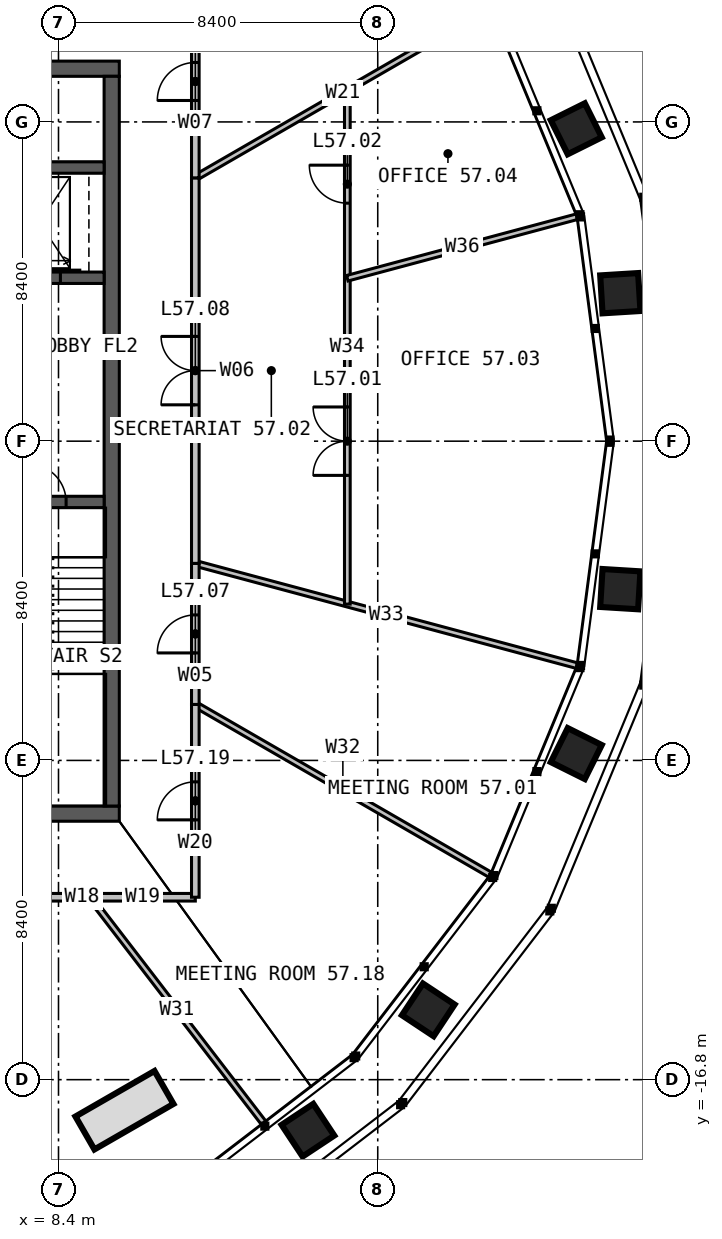
"""IFC4 building model, lengths in metres.
Left out: names, types, materials, properties, quantities, classifications, styles, units other than length and angle.
Written with IfcOpenShell. Run it as: python <this file> out.ifc"""

import sys

from ifc_helpers import new_model, si_unit, direction, frame, frame_2d, origin, place, context, subcontext, project, spatial, rectangle, extrude, element, fill, save


model = new_model("IFC4")
c1 = context("Model", 3, precision=1e-05, world=origin(), true_north=direction((0.0, 1.0)))
c2 = subcontext(c1, "Body", "Model", "MODEL_VIEW")
j1 = project(units=[si_unit("LENGTHUNIT", "METRE"), si_unit("PLANEANGLEUNIT", "RADIAN")], contexts=[c1])
p1 = place(None, origin())
s1 = spatial("IfcSite", under=j1, at=p1, CompositionType="ELEMENT")
p2 = place(p1, origin())
s2 = spatial("IfcBuilding", under=s1, at=p2, CompositionType="ELEMENT")
p3 = place(p2, frame((0.0, 0.0, 236.0)))
s3 = spatial("IfcBuildingStorey", under=s2, at=p3, CompositionType="ELEMENT", Elevation=236.0)
p4 = place(p3, frame((-10.0, 9.8, 0.0), z_axis=(0.0, 0.0, 1.0), x_axis=(1.0, 0.0, 0.0)))
e1 = element("IfcWall", 1, at=p4, inside=s3, PredefinedType="SOLIDWALL", context=c2, shape_type="SweptSolid", body=[
    extrude(rectangle(XDim=20.0, YDim=0.4, at=frame_2d((10.0, 0.0))), origin(), (0.0, 0.0, 1.0), 4.0),
])
p5 = place(p4, frame((9.4, 0.0, 0.0)))
e2 = element("IfcOpeningElement", 2, at=p5, cuts=e1, PredefinedType="OPENING", context=c2, shape_type="SweptSolid", body=[
    extrude(rectangle(XDim=1.2, YDim=2.2, at=frame_2d((0.6, 1.1))), frame((0.0, 0.21, 0.0), z_axis=(0.0, -1.0, 0.0), x_axis=(1.0, 0.0, 0.0)), (0.0, 0.0, 1.0), 0.42),
])
p6 = place(p3, frame((10.0, -9.8, 0.0), z_axis=(0.0, 0.0, 1.0), x_axis=(-1.0, 0.0, 0.0)))
e3 = element("IfcWall", 3, at=p6, inside=s3, PredefinedType="SOLIDWALL", context=c2, shape_type="SweptSolid", body=[
    extrude(rectangle(XDim=20.0, YDim=0.4, at=frame_2d((10.0, 0.0))), origin(), (0.0, 0.0, 1.0), 4.0),
])
p7 = place(p6, frame((6.875, 0.0, 0.0)))
e4 = element("IfcOpeningElement", 4, at=p7, cuts=e3, PredefinedType="OPENING", context=c2, shape_type="SweptSolid", body=[
    extrude(rectangle(XDim=1.2, YDim=2.2, at=frame_2d((0.6, 1.1))), frame((0.0, 0.21, 0.0), z_axis=(0.0, -1.0, 0.0), x_axis=(1.0, 0.0, 0.0)), (0.0, 0.0, 1.0), 0.42),
])
p8 = place(p3, frame((9.8, -9.6, 0.0), z_axis=(0.0, 0.0, 1.0), x_axis=(0.0, 1.0, 0.0)))
e5 = element("IfcWall", 5, at=p8, inside=s3, PredefinedType="SOLIDWALL", context=c2, shape_type="SweptSolid", body=[
    extrude(rectangle(XDim=19.2, YDim=0.4, at=frame_2d((9.6, 0.0))), origin(), (0.0, 0.0, 1.0), 4.0),
])
p9 = place(p3, frame((6.6, -1.6, 0.0), z_axis=(0.0, 0.0, 1.0), x_axis=(1.0, 0.0, 0.0)))
e6 = element("IfcWall", 6, at=p9, inside=s3, PredefinedType="SOLIDWALL", context=c2, shape_type="SweptSolid", body=[
    extrude(rectangle(XDim=3.0, YDim=0.3, at=frame_2d((1.5, 0.0))), origin(), (0.0, 0.0, 1.0), 4.0),
])
p10 = place(p9, frame((1.0, 0.0, 0.0)))
e7 = element("IfcOpeningElement", 7, at=p10, cuts=e6, PredefinedType="OPENING", context=c2, shape_type="SweptSolid", body=[
    extrude(rectangle(XDim=1.0, YDim=2.2, at=frame_2d((0.5, 1.1))), frame((0.0, 0.16, 0.0), z_axis=(0.0, -1.0, 0.0), x_axis=(1.0, 0.0, 0.0)), (0.0, 0.0, 1.0), 0.32),
])
p11 = place(p3, frame((6.6, 4.3, 0.0), z_axis=(0.0, 0.0, 1.0), x_axis=(1.0, 0.0, 0.0)))
e8 = element("IfcWall", 8, at=p11, inside=s3, PredefinedType="SOLIDWALL", context=c2, shape_type="SweptSolid", body=[
    extrude(rectangle(XDim=3.0, YDim=0.3, at=frame_2d((1.5, 0.0))), origin(), (0.0, 0.0, 1.0), 4.0),
])
p12 = place(p11, frame((0.75, 0.0, 0.0)))
e9 = element("IfcOpeningElement", 9, at=p12, cuts=e8, PredefinedType="OPENING", context=c2, shape_type="SweptSolid", body=[
    extrude(rectangle(XDim=1.1, YDim=2.2, at=frame_2d((0.55, 1.1))), frame((0.0, 0.16, 0.0), z_axis=(0.0, -1.0, 0.0), x_axis=(1.0, 0.0, 0.0)), (0.0, 0.0, 1.0), 0.32),
])
p13 = place(p3, frame((6.6, 7.2, 0.0), z_axis=(0.0, 0.0, 1.0), x_axis=(1.0, 0.0, 0.0)))
e10 = element("IfcWall", 10, at=p13, inside=s3, PredefinedType="SOLIDWALL", context=c2, shape_type="SweptSolid", body=[
    extrude(rectangle(XDim=3.0, YDim=0.3, at=frame_2d((1.5, 0.0))), origin(), (0.0, 0.0, 1.0), 4.0),
])
p14 = place(p3, frame((12.0, -6.928, 0.0), z_axis=(0.0, 0.0, 1.0), x_axis=(0.866025969295, -0.499999020506, 0.0)))
e11 = element("IfcWall", 11, at=p14, inside=s3, PredefinedType="PARTITIONING", context=c2, shape_type="SweptSolid", body=[
    extrude(rectangle(XDim=8.966, YDim=0.15, at=frame_2d((4.483, 0.0))), origin(), (0.0, 0.0, 1.0), 2.79),
])
p15 = place(p3, frame((12.0, -3.215, 0.0), z_axis=(0.0, 0.0, 1.0), x_axis=(0.965927197493, -0.258813927647, 0.0)))
e12 = element("IfcWall", 12, at=p15, inside=s3, PredefinedType="PARTITIONING", context=c2, shape_type="SweptSolid", body=[
    extrude(rectangle(XDim=10.399, YDim=0.15, at=frame_2d((5.199, 0.0))), origin(), (0.0, 0.0, 1.0), 2.79),
])
p16 = place(p3, frame((12.0, 6.928, 0.0), z_axis=(0.0, 0.0, 1.0), x_axis=(0.866025969295, 0.499999020506, 0.0)))
e13 = element("IfcWall", 13, at=p16, inside=s3, PredefinedType="PARTITIONING", context=c2, shape_type="SweptSolid", body=[
    extrude(rectangle(XDim=8.966, YDim=0.15, at=frame_2d((4.483, 0.0))), origin(), (0.0, 0.0, 1.0), 2.79),
])
p17 = place(p3, frame((9.231, -12.0, 0.0), z_axis=(0.0, 0.0, 1.0), x_axis=(0.609721791475, -0.792615503886, 0.0)))
e14 = element("IfcWall", 14, at=p17, inside=s3, PredefinedType="PARTITIONING", context=c2, shape_type="SweptSolid", body=[
    extrude(rectangle(XDim=7.487, YDim=0.15, at=frame_2d((3.744, 0.0))), origin(), (0.0, 0.0, 1.0), 2.79),
])
p18 = place(p3, frame((12.0, -6.928, 0.0), z_axis=(0.0, 0.0, 1.0), x_axis=(0.0, 1.0, 0.0)))
e15 = element("IfcWall", 15, at=p18, inside=s3, PredefinedType="PARTITIONING", context=c2, shape_type="SweptSolid", body=[
    extrude(rectangle(XDim=3.713, YDim=0.2, at=frame_2d((1.856, 0.0))), origin(), (0.0, 0.0, 1.0), 3.8),
])
p19 = place(p18, frame((1.356, 0.0, 0.0)))
e16 = element("IfcOpeningElement", 16, at=p19, cuts=e15, PredefinedType="OPENING", context=c2, shape_type="SweptSolid", body=[
    extrude(rectangle(XDim=1.0, YDim=2.2, at=frame_2d((0.5, 1.1))), frame((0.0, 0.11, 0.0), z_axis=(0.0, -1.0, 0.0), x_axis=(1.0, 0.0, 0.0)), (0.0, 0.0, 1.0), 0.22),
])
p20 = place(p3, frame((16.0, -4.287, 0.0), z_axis=(0.0, 0.0, 1.0), x_axis=(0.0, 1.0, 0.0)))
e17 = element("IfcWall", 17, at=p20, inside=s3, PredefinedType="PARTITIONING", context=c2, shape_type="SweptSolid", body=[
    extrude(rectangle(XDim=13.525, YDim=0.15, at=frame_2d((6.762, 0.0))), origin(), (0.0, 0.0, 1.0), 2.79),
])
p21 = place(p20, frame((3.387, 0.0, 0.0)))
e18 = element("IfcOpeningElement", 18, at=p21, cuts=e17, PredefinedType="OPENING", context=c2, shape_type="SweptSolid", body=[
    extrude(rectangle(XDim=1.8, YDim=2.2, at=frame_2d((0.9, 1.1))), frame((0.0, 0.085, 0.0), z_axis=(0.0, -1.0, 0.0), x_axis=(1.0, 0.0, 0.0)), (0.0, 0.0, 1.0), 0.17),
])
p22 = place(p20, frame((10.55, 0.0, 0.0)))
e19 = element("IfcOpeningElement", 19, at=p22, cuts=e17, PredefinedType="OPENING", context=c2, shape_type="SweptSolid", body=[
    extrude(rectangle(XDim=1.0, YDim=2.2, at=frame_2d((0.5, 1.1))), frame((0.0, 0.085, 0.0), z_axis=(0.0, -1.0, 0.0), x_axis=(1.0, 0.0, 0.0)), (0.0, 0.0, 1.0), 0.17),
])
p23 = place(p3, frame((16.0, 4.287, 0.0), z_axis=(0.0, 0.0, 1.0), x_axis=(0.965927328821, 0.258813437513, 0.0)))
e20 = element("IfcWall", 20, at=p23, inside=s3, PredefinedType="PARTITIONING", context=c2, shape_type="SweptSolid", body=[
    extrude(rectangle(XDim=6.258, YDim=0.15, at=frame_2d((3.129, 0.0))), origin(), (0.0, 0.0, 1.0), 2.79),
])
p24 = place(p3, frame((12.0, -3.215, 0.0), z_axis=(0.0, 0.0, 1.0), x_axis=(0.0, 1.0, 0.0)))
e21 = element("IfcWall", 21, at=p24, inside=s3, PredefinedType="PARTITIONING", context=c2, shape_type="SweptSolid", body=[
    extrude(rectangle(XDim=10.144, YDim=0.2, at=frame_2d((5.072, 0.0))), origin(), (0.0, 0.0, 1.0), 3.8),
])
p25 = place(p24, frame((4.172, 0.0, 0.0)))
e22 = element("IfcOpeningElement", 22, at=p25, cuts=e21, PredefinedType="OPENING", context=c2, shape_type="SweptSolid", body=[
    extrude(rectangle(XDim=1.8, YDim=2.2, at=frame_2d((0.9, 1.1))), frame((0.0, 0.11, 0.0), z_axis=(0.0, -1.0, 0.0), x_axis=(1.0, 0.0, 0.0)), (0.0, 0.0, 1.0), 0.22),
])
p26 = place(p3, frame((12.0, 6.928, 0.0), z_axis=(0.0, 0.0, 1.0), x_axis=(0.0, 1.0, 0.0)))
e23 = element("IfcWall", 23, at=p26, inside=s3, PredefinedType="PARTITIONING", context=c2, shape_type="SweptSolid", body=[
    extrude(rectangle(XDim=5.072, YDim=0.2, at=frame_2d((2.536, 0.0))), origin(), (0.0, 0.0, 1.0), 3.8),
])
p27 = place(p26, frame((2.036, 0.0, 0.0)))
e24 = element("IfcOpeningElement", 24, at=p27, cuts=e23, PredefinedType="OPENING", context=c2, shape_type="SweptSolid", body=[
    extrude(rectangle(XDim=1.0, YDim=2.2, at=frame_2d((0.5, 1.1))), frame((0.0, 0.11, 0.0), z_axis=(0.0, -1.0, 0.0), x_axis=(1.0, 0.0, 0.0)), (0.0, 0.0, 1.0), 0.22),
])
p28 = place(p3, frame((-1.594, -12.0, 0.0), z_axis=(0.0, 0.0, 1.0), x_axis=(1.0, 0.0, 0.0)))
e25 = element("IfcWall", 25, at=p28, inside=s3, PredefinedType="PARTITIONING", context=c2, shape_type="SweptSolid", body=[
    extrude(rectangle(XDim=10.404, YDim=0.2, at=frame_2d((5.202, 0.0))), origin(), (0.0, 0.0, 1.0), 3.2),
])
p29 = place(p28, frame((4.513, 0.0, 0.0)))
e26 = element("IfcOpeningElement", 26, at=p29, cuts=e25, PredefinedType="OPENING", context=c2, shape_type="SweptSolid", body=[
    extrude(rectangle(XDim=1.8, YDim=2.2, at=frame_2d((0.9, 1.1))), frame((0.0, 0.11, 0.0), z_axis=(0.0, -1.0, 0.0), x_axis=(1.0, 0.0, 0.0)), (0.0, 0.0, 1.0), 0.22),
])
p30 = place(p3, frame((8.81, -12.0, 0.0), z_axis=(0.0, 0.0, 1.0), x_axis=(1.0, 0.0, 0.0)))
e27 = element("IfcWall", 27, at=p30, inside=s3, PredefinedType="PARTITIONING", context=c2, shape_type="SweptSolid", body=[
    extrude(rectangle(XDim=0.421, YDim=0.2, at=frame_2d((0.211, 0.0))), origin(), (0.0, 0.0, 1.0), 3.8),
])
p31 = place(p3, frame((9.231, -12.0, 0.0), z_axis=(0.0, 0.0, 1.0), x_axis=(1.0, 0.0, 0.0)))
e28 = element("IfcWall", 28, at=p31, inside=s3, PredefinedType="PARTITIONING", context=c2, shape_type="SweptSolid", body=[
    extrude(rectangle(XDim=2.769, YDim=0.2, at=frame_2d((1.385, 0.0))), origin(), (0.0, 0.0, 1.0), 3.8),
])
p32 = place(p3, frame((12.0, -12.0, 0.0), z_axis=(0.0, 0.0, 1.0), x_axis=(0.0, 1.0, 0.0)))
e29 = element("IfcWall", 29, at=p32, inside=s3, PredefinedType="PARTITIONING", context=c2, shape_type="SweptSolid", body=[
    extrude(rectangle(XDim=5.072, YDim=0.2, at=frame_2d((2.536, 0.0))), origin(), (0.0, 0.0, 1.0), 3.8),
])
p33 = place(p32, frame((2.036, 0.0, 0.0)))
e30 = element("IfcOpeningElement", 30, at=p33, cuts=e29, PredefinedType="OPENING", context=c2, shape_type="SweptSolid", body=[
    extrude(rectangle(XDim=1.0, YDim=2.2, at=frame_2d((0.5, 1.1))), frame((0.0, 0.11, 0.0), z_axis=(0.0, -1.0, 0.0), x_axis=(1.0, 0.0, 0.0)), (0.0, 0.0, 1.0), 0.22),
])
p34 = place(p10, origin())
e31 = element("IfcDoor", 31, at=p34, inside=s3, OperationType="SINGLE_SWING_LEFT", PredefinedType="DOOR", context=c2, shape_type="SweptSolid", body=[
    extrude(rectangle(XDim=1.0, YDim=2.2, at=frame_2d((0.5, 1.1))), frame((0.0, 0.025, 0.0), z_axis=(0.0, -1.0, 0.0), x_axis=(1.0, 0.0, 0.0)), (0.0, 0.0, 1.0), 0.05),
])
fill(e7, e31)
p35 = place(p12, origin())
e32 = element("IfcDoor", 32, at=p35, inside=s3, OperationType="SLIDING_TO_LEFT", PredefinedType="DOOR", context=c2, shape_type="SweptSolid", body=[
    extrude(rectangle(XDim=1.1, YDim=2.2, at=frame_2d((0.55, 1.1))), frame((0.0, 0.025, 0.0), z_axis=(0.0, -1.0, 0.0), x_axis=(1.0, 0.0, 0.0)), (0.0, 0.0, 1.0), 0.05),
])
fill(e9, e32)
p36 = place(p19, origin())
e33 = element("IfcDoor", 33, at=p36, inside=s3, OperationType="SINGLE_SWING_LEFT", PredefinedType="DOOR", context=c2, shape_type="SweptSolid", body=[
    extrude(rectangle(XDim=1.0, YDim=2.2, at=frame_2d((0.5, 1.1))), frame((0.0, 0.025, 0.0), z_axis=(0.0, -1.0, 0.0), x_axis=(1.0, 0.0, 0.0)), (0.0, 0.0, 1.0), 0.05),
])
fill(e16, e33)
p37 = place(p21, origin())
e34 = element("IfcDoor", 34, at=p37, inside=s3, OperationType="DOUBLE_DOOR_SINGLE_SWING", PredefinedType="DOOR", context=c2, shape_type="SweptSolid", body=[
    extrude(rectangle(XDim=1.8, YDim=2.2, at=frame_2d((0.9, 1.1))), frame((0.0, 0.025, 0.0), z_axis=(0.0, -1.0, 0.0), x_axis=(1.0, 0.0, 0.0)), (0.0, 0.0, 1.0), 0.05),
])
fill(e18, e34)
p38 = place(p22, origin())
e35 = element("IfcDoor", 35, at=p38, inside=s3, OperationType="SINGLE_SWING_RIGHT", PredefinedType="DOOR", context=c2, shape_type="SweptSolid", body=[
    extrude(rectangle(XDim=1.0, YDim=2.2, at=frame_2d((0.5, 1.1))), frame((0.0, 0.025, 0.0), z_axis=(0.0, -1.0, 0.0), x_axis=(1.0, 0.0, 0.0)), (0.0, 0.0, 1.0), 0.05),
])
fill(e19, e35)
p39 = place(p25, origin())
e36 = element("IfcDoor", 36, at=p39, inside=s3, OperationType="DOUBLE_DOOR_SINGLE_SWING", PredefinedType="DOOR", context=c2, shape_type="SweptSolid", body=[
    extrude(rectangle(XDim=1.8, YDim=2.2, at=frame_2d((0.9, 1.1))), frame((0.0, 0.025, 0.0), z_axis=(0.0, -1.0, 0.0), x_axis=(1.0, 0.0, 0.0)), (0.0, 0.0, 1.0), 0.05),
])
fill(e22, e36)
p40 = place(p27, origin())
e37 = element("IfcDoor", 37, at=p40, inside=s3, OperationType="SINGLE_SWING_LEFT", PredefinedType="DOOR", context=c2, shape_type="SweptSolid", body=[
    extrude(rectangle(XDim=1.0, YDim=2.2, at=frame_2d((0.5, 1.1))), frame((0.0, 0.025, 0.0), z_axis=(0.0, -1.0, 0.0), x_axis=(1.0, 0.0, 0.0)), (0.0, 0.0, 1.0), 0.05),
])
fill(e24, e37)
p41 = place(p33, origin())
e38 = element("IfcDoor", 38, at=p41, inside=s3, OperationType="SINGLE_SWING_LEFT", PredefinedType="DOOR", context=c2, shape_type="SweptSolid", body=[
    extrude(rectangle(XDim=1.0, YDim=2.2, at=frame_2d((0.5, 1.1))), frame((0.0, 0.025, 0.0), z_axis=(0.0, -1.0, 0.0), x_axis=(1.0, 0.0, 0.0)), (0.0, 0.0, 1.0), 0.05),
])
fill(e30, e38)
save(model, sys.argv[1])
